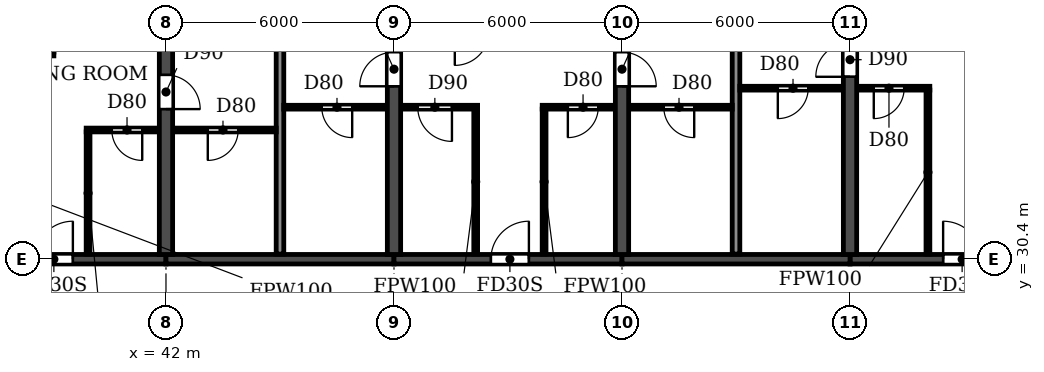
"""IFC4 building model, lengths in metres.
Left out: names, types, materials, properties, quantities, classifications, styles, units other than length and angle.
Written with IfcOpenShell. Run it as: python <this file> out.ifc"""

import sys

from ifc_helpers import new_model, si_unit, direction, frame, frame_2d, origin, place, context, subcontext, project, spatial, rectangle, extrude, element, fill, save


model = new_model("IFC4")
c1 = context("Model", 3, precision=1e-05, world=origin(), true_north=direction((0.0, 1.0)))
c2 = subcontext(c1, "Body", "Model", "MODEL_VIEW")
j1 = project(units=[si_unit("LENGTHUNIT", "METRE"), si_unit("PLANEANGLEUNIT", "RADIAN")], contexts=[c1])
p1 = place(None, origin())
s1 = spatial("IfcSite", under=j1, at=p1, CompositionType="ELEMENT")
p2 = place(p1, origin())
s2 = spatial("IfcBuilding", under=s1, at=p2, CompositionType="ELEMENT")
p3 = place(p2, frame((0.0, 0.0, 82.8)))
s3 = spatial("IfcBuildingStorey", under=s2, at=p3, CompositionType="ELEMENT", Elevation=82.8)
p4 = place(p3, frame((42.0, 30.525, 0.0), z_axis=(0.0, 0.0, 1.0), x_axis=(0.0, 1.0, 0.0)))
e1 = element("IfcWall", 1, at=p4, inside=s3, PredefinedType="SHEAR", context=c2, shape_type="SweptSolid", body=[
    extrude(rectangle(XDim=12.875, YDim=0.35, at=frame_2d((6.438, 0.0))), origin(), (0.0, 0.0, 1.0), 3.06),
])
p5 = place(p4, frame((3.825, 0.0, 0.0)))
e2 = element("IfcOpeningElement", 2, at=p5, cuts=e1, PredefinedType="OPENING", context=c2, shape_type="SweptSolid", body=[
    extrude(rectangle(XDim=0.9, YDim=2.1, at=frame_2d((0.45, 1.05))), frame((0.0, 0.185, 0.0), z_axis=(0.0, -1.0, 0.0), x_axis=(1.0, 0.0, 0.0)), (0.0, 0.0, 1.0), 0.37),
])
p6 = place(p3, frame((48.0, 30.525, 0.0), z_axis=(0.0, 0.0, 1.0), x_axis=(0.0, 1.0, 0.0)))
e3 = element("IfcWall", 3, at=p6, inside=s3, PredefinedType="SHEAR", context=c2, shape_type="SweptSolid", body=[
    extrude(rectangle(XDim=12.875, YDim=0.35, at=frame_2d((6.438, 0.0))), origin(), (0.0, 0.0, 1.0), 3.06),
])
p7 = place(p6, frame((4.425, 0.0, 0.0)))
e4 = element("IfcOpeningElement", 4, at=p7, cuts=e3, PredefinedType="OPENING", context=c2, shape_type="SweptSolid", body=[
    extrude(rectangle(XDim=0.9, YDim=2.1, at=frame_2d((0.45, 1.05))), frame((0.0, 0.185, 0.0), z_axis=(0.0, -1.0, 0.0), x_axis=(1.0, 0.0, 0.0)), (0.0, 0.0, 1.0), 0.37),
])
p8 = place(p3, frame((54.0, 30.525, 0.0), z_axis=(0.0, 0.0, 1.0), x_axis=(0.0, 1.0, 0.0)))
e5 = element("IfcWall", 5, at=p8, inside=s3, PredefinedType="SHEAR", context=c2, shape_type="SweptSolid", body=[
    extrude(rectangle(XDim=12.875, YDim=0.35, at=frame_2d((6.438, 0.0))), origin(), (0.0, 0.0, 1.0), 3.06),
])
p9 = place(p8, frame((4.425, 0.0, 0.0)))
e6 = element("IfcOpeningElement", 6, at=p9, cuts=e5, PredefinedType="OPENING", context=c2, shape_type="SweptSolid", body=[
    extrude(rectangle(XDim=0.9, YDim=2.1, at=frame_2d((0.45, 1.05))), frame((0.0, 0.185, 0.0), z_axis=(0.0, -1.0, 0.0), x_axis=(1.0, 0.0, 0.0)), (0.0, 0.0, 1.0), 0.37),
])
p10 = place(p3, frame((60.0, 30.525, 0.0), z_axis=(0.0, 0.0, 1.0), x_axis=(0.0, 1.0, 0.0)))
e7 = element("IfcWall", 7, at=p10, inside=s3, PredefinedType="SHEAR", context=c2, shape_type="SweptSolid", body=[
    extrude(rectangle(XDim=12.875, YDim=0.35, at=frame_2d((6.438, 0.0))), origin(), (0.0, 0.0, 1.0), 3.06),
])
p11 = place(p10, frame((4.675, 0.0, 0.0)))
e8 = element("IfcOpeningElement", 8, at=p11, cuts=e7, PredefinedType="OPENING", context=c2, shape_type="SweptSolid", body=[
    extrude(rectangle(XDim=0.9, YDim=2.1, at=frame_2d((0.45, 1.05))), frame((0.0, 0.185, 0.0), z_axis=(0.0, -1.0, 0.0), x_axis=(1.0, 0.0, 0.0)), (0.0, 0.0, 1.0), 0.37),
])
p12 = place(p3, frame((36.0, 30.4, 0.0), z_axis=(0.0, 0.0, 1.0), x_axis=(1.0, 0.0, 0.0)))
e9 = element("IfcWall", 9, at=p12, inside=s3, PredefinedType="SHEAR", context=c2, shape_type="SweptSolid", body=[
    extrude(rectangle(XDim=6.0, YDim=0.25, at=frame_2d((3.0, 0.0))), origin(), (0.0, 0.0, 1.0), 2.46),
])
p13 = place(p12, frame((2.55, 0.0, 0.0)))
e10 = element("IfcOpeningElement", 10, at=p13, cuts=e9, PredefinedType="OPENING", context=c2, shape_type="SweptSolid", body=[
    extrude(rectangle(XDim=1.0, YDim=2.1, at=frame_2d((0.5, 1.05))), frame((0.0, 0.135, 0.0), z_axis=(0.0, -1.0, 0.0), x_axis=(1.0, 0.0, 0.0)), (0.0, 0.0, 1.0), 0.27),
])
p14 = place(p3, frame((42.0, 30.4, 0.0), z_axis=(0.0, 0.0, 1.0), x_axis=(1.0, 0.0, 0.0)))
e11 = element("IfcWall", 11, at=p14, inside=s3, PredefinedType="SHEAR", context=c2, shape_type="SweptSolid", body=[
    extrude(rectangle(XDim=6.0, YDim=0.25, at=frame_2d((3.0, 0.0))), origin(), (0.0, 0.0, 1.0), 2.46),
])
p15 = place(p3, frame((48.0, 30.4, 0.0), z_axis=(0.0, 0.0, 1.0), x_axis=(1.0, 0.0, 0.0)))
e12 = element("IfcWall", 12, at=p15, inside=s3, PredefinedType="SHEAR", context=c2, shape_type="SweptSolid", body=[
    extrude(rectangle(XDim=6.0, YDim=0.25, at=frame_2d((3.0, 0.0))), origin(), (0.0, 0.0, 1.0), 2.46),
])
p16 = place(p15, frame((2.55, 0.0, 0.0)))
e13 = element("IfcOpeningElement", 13, at=p16, cuts=e12, PredefinedType="OPENING", context=c2, shape_type="SweptSolid", body=[
    extrude(rectangle(XDim=1.0, YDim=2.1, at=frame_2d((0.5, 1.05))), frame((0.0, 0.135, 0.0), z_axis=(0.0, -1.0, 0.0), x_axis=(1.0, 0.0, 0.0)), (0.0, 0.0, 1.0), 0.27),
])
p17 = place(p3, frame((54.0, 30.4, 0.0), z_axis=(0.0, 0.0, 1.0), x_axis=(1.0, 0.0, 0.0)))
e14 = element("IfcWall", 14, at=p17, inside=s3, PredefinedType="SHEAR", context=c2, shape_type="SweptSolid", body=[
    extrude(rectangle(XDim=6.0, YDim=0.25, at=frame_2d((3.0, 0.0))), origin(), (0.0, 0.0, 1.0), 2.46),
])
p18 = place(p3, frame((60.0, 30.4, 0.0), z_axis=(0.0, 0.0, 1.0), x_axis=(1.0, 0.0, 0.0)))
e15 = element("IfcWall", 15, at=p18, inside=s3, PredefinedType="SHEAR", context=c2, shape_type="SweptSolid", body=[
    extrude(rectangle(XDim=6.0, YDim=0.25, at=frame_2d((3.0, 0.0))), origin(), (0.0, 0.0, 1.0), 2.46),
])
p19 = place(p18, frame((2.45, 0.0, 0.0)))
e16 = element("IfcOpeningElement", 16, at=p19, cuts=e15, PredefinedType="OPENING", context=c2, shape_type="SweptSolid", body=[
    extrude(rectangle(XDim=1.0, YDim=2.1, at=frame_2d((0.5, 1.05))), frame((0.0, 0.135, 0.0), z_axis=(0.0, -1.0, 0.0), x_axis=(1.0, 0.0, 0.0)), (0.0, 0.0, 1.0), 0.27),
])
for number, where, z_axis, x_axis in (
    (17, (45.0, 30.535, 0.0), (0.0, 0.0, 1.0), (0.0, 1.0, 0.0)),
    (18, (57.0, 30.535, 0.0), (0.0, 0.0, 1.0), (0.0, 1.0, 0.0)),
):
    element("IfcWall", number, at=place(p3, frame(where, z_axis=z_axis, x_axis=x_axis)), inside=s3, PredefinedType="PARTITIONING", context=c2, shape_type="SweptSolid", body=[
        extrude(rectangle(XDim=13.005, YDim=0.2, at=frame_2d((6.502, 0.0))), origin(), (0.0, 0.0, 1.0), 3.06),
    ])
p20 = place(p3, frame((39.9, 33.8, 0.0), z_axis=(0.0, 0.0, 1.0), x_axis=(1.0, 0.0, 0.0)))
e19 = element("IfcWall", 19, at=p20, inside=s3, PredefinedType="PARTITIONING", context=c2, shape_type="SweptSolid", body=[
    extrude(rectangle(XDim=1.915, YDim=0.1, at=frame_2d((0.958, 0.0))), origin(), (0.0, 0.0, 1.0), 3.06),
])
p21 = place(p20, frame((0.675, 0.0, 0.0)))
e20 = element("IfcOpeningElement", 20, at=p21, cuts=e19, PredefinedType="OPENING", context=c2, shape_type="SweptSolid", body=[
    extrude(rectangle(XDim=0.8, YDim=2.1, at=frame_2d((0.4, 1.05))), frame((0.0, 0.06, 0.0), z_axis=(0.0, -1.0, 0.0), x_axis=(1.0, 0.0, 0.0)), (0.0, 0.0, 1.0), 0.12),
])
p22 = place(p3, frame((42.185, 33.8, 0.0), z_axis=(0.0, 0.0, 1.0), x_axis=(1.0, 0.0, 0.0)))
e21 = element("IfcWall", 21, at=p22, inside=s3, PredefinedType="PARTITIONING", context=c2, shape_type="SweptSolid", body=[
    extrude(rectangle(XDim=2.715, YDim=0.1, at=frame_2d((1.357, 0.0))), origin(), (0.0, 0.0, 1.0), 3.06),
])
p23 = place(p22, frame((0.915, 0.0, 0.0)))
e22 = element("IfcOpeningElement", 22, at=p23, cuts=e21, PredefinedType="OPENING", context=c2, shape_type="SweptSolid", body=[
    extrude(rectangle(XDim=0.8, YDim=2.1, at=frame_2d((0.4, 1.05))), frame((0.0, 0.06, 0.0), z_axis=(0.0, -1.0, 0.0), x_axis=(1.0, 0.0, 0.0)), (0.0, 0.0, 1.0), 0.12),
])
p24 = place(p3, frame((45.1, 34.4, 0.0), z_axis=(0.0, 0.0, 1.0), x_axis=(1.0, 0.0, 0.0)))
e23 = element("IfcWall", 23, at=p24, inside=s3, PredefinedType="PARTITIONING", context=c2, shape_type="SweptSolid", body=[
    extrude(rectangle(XDim=2.715, YDim=0.1, at=frame_2d((1.357, 0.0))), origin(), (0.0, 0.0, 1.0), 3.06),
])
p25 = place(p24, frame((1.0, 0.0, 0.0)))
e24 = element("IfcOpeningElement", 24, at=p25, cuts=e23, PredefinedType="OPENING", context=c2, shape_type="SweptSolid", body=[
    extrude(rectangle(XDim=0.8, YDim=2.1, at=frame_2d((0.4, 1.05))), frame((0.0, 0.06, 0.0), z_axis=(0.0, -1.0, 0.0), x_axis=(1.0, 0.0, 0.0)), (0.0, 0.0, 1.0), 0.12),
])
p26 = place(p3, frame((48.185, 34.4, 0.0), z_axis=(0.0, 0.0, 1.0), x_axis=(1.0, 0.0, 0.0)))
e25 = element("IfcWall", 25, at=p26, inside=s3, PredefinedType="PARTITIONING", context=c2, shape_type="SweptSolid", body=[
    extrude(rectangle(XDim=2.015, YDim=0.1, at=frame_2d((1.007, 0.0))), origin(), (0.0, 0.0, 1.0), 3.06),
])
p27 = place(p26, frame((0.44, 0.0, 0.0)))
e26 = element("IfcOpeningElement", 26, at=p27, cuts=e25, PredefinedType="OPENING", context=c2, shape_type="SweptSolid", body=[
    extrude(rectangle(XDim=0.9, YDim=2.1, at=frame_2d((0.45, 1.05))), frame((0.0, 0.06, 0.0), z_axis=(0.0, -1.0, 0.0), x_axis=(1.0, 0.0, 0.0)), (0.0, 0.0, 1.0), 0.12),
])
p28 = place(p3, frame((51.9, 34.4, 0.0), z_axis=(0.0, 0.0, 1.0), x_axis=(1.0, 0.0, 0.0)))
e27 = element("IfcWall", 27, at=p28, inside=s3, PredefinedType="PARTITIONING", context=c2, shape_type="SweptSolid", body=[
    extrude(rectangle(XDim=1.915, YDim=0.1, at=frame_2d((0.958, 0.0))), origin(), (0.0, 0.0, 1.0), 3.06),
])
p29 = place(p28, frame((0.675, 0.0, 0.0)))
e28 = element("IfcOpeningElement", 28, at=p29, cuts=e27, PredefinedType="OPENING", context=c2, shape_type="SweptSolid", body=[
    extrude(rectangle(XDim=0.8, YDim=2.1, at=frame_2d((0.4, 1.05))), frame((0.0, 0.06, 0.0), z_axis=(0.0, -1.0, 0.0), x_axis=(1.0, 0.0, 0.0)), (0.0, 0.0, 1.0), 0.12),
])
p30 = place(p3, frame((54.185, 34.4, 0.0), z_axis=(0.0, 0.0, 1.0), x_axis=(1.0, 0.0, 0.0)))
e29 = element("IfcWall", 29, at=p30, inside=s3, PredefinedType="PARTITIONING", context=c2, shape_type="SweptSolid", body=[
    extrude(rectangle(XDim=2.715, YDim=0.1, at=frame_2d((1.357, 0.0))), origin(), (0.0, 0.0, 1.0), 3.06),
])
p31 = place(p30, frame((0.915, 0.0, 0.0)))
e30 = element("IfcOpeningElement", 30, at=p31, cuts=e29, PredefinedType="OPENING", context=c2, shape_type="SweptSolid", body=[
    extrude(rectangle(XDim=0.8, YDim=2.1, at=frame_2d((0.4, 1.05))), frame((0.0, 0.06, 0.0), z_axis=(0.0, -1.0, 0.0), x_axis=(1.0, 0.0, 0.0)), (0.0, 0.0, 1.0), 0.12),
])
p32 = place(p3, frame((57.1, 34.9, 0.0), z_axis=(0.0, 0.0, 1.0), x_axis=(1.0, 0.0, 0.0)))
e31 = element("IfcWall", 31, at=p32, inside=s3, PredefinedType="PARTITIONING", context=c2, shape_type="SweptSolid", body=[
    extrude(rectangle(XDim=2.715, YDim=0.1, at=frame_2d((1.357, 0.0))), origin(), (0.0, 0.0, 1.0), 3.06),
])
p33 = place(p32, frame((1.0, 0.0, 0.0)))
e32 = element("IfcOpeningElement", 32, at=p33, cuts=e31, PredefinedType="OPENING", context=c2, shape_type="SweptSolid", body=[
    extrude(rectangle(XDim=0.8, YDim=2.1, at=frame_2d((0.4, 1.05))), frame((0.0, 0.06, 0.0), z_axis=(0.0, -1.0, 0.0), x_axis=(1.0, 0.0, 0.0)), (0.0, 0.0, 1.0), 0.12),
])
p34 = place(p3, frame((60.185, 34.9, 0.0), z_axis=(0.0, 0.0, 1.0), x_axis=(1.0, 0.0, 0.0)))
e33 = element("IfcWall", 33, at=p34, inside=s3, PredefinedType="PARTITIONING", context=c2, shape_type="SweptSolid", body=[
    extrude(rectangle(XDim=1.915, YDim=0.1, at=frame_2d((0.958, 0.0))), origin(), (0.0, 0.0, 1.0), 3.06),
])
p35 = place(p34, frame((0.44, 0.0, 0.0)))
e34 = element("IfcOpeningElement", 34, at=p35, cuts=e33, PredefinedType="OPENING", context=c2, shape_type="SweptSolid", body=[
    extrude(rectangle(XDim=0.8, YDim=2.1, at=frame_2d((0.4, 1.05))), frame((0.0, 0.06, 0.0), z_axis=(0.0, -1.0, 0.0), x_axis=(1.0, 0.0, 0.0)), (0.0, 0.0, 1.0), 0.12),
])
p36 = place(p3, frame((36.185, 35.8, 0.0), z_axis=(0.0, 0.0, 1.0), x_axis=(1.0, 0.0, 0.0)))
e35 = element("IfcWall", 35, at=p36, inside=s3, PredefinedType="PARTITIONING", context=c2, shape_type="SweptSolid", body=[
    extrude(rectangle(XDim=2.865, YDim=0.1, at=frame_2d((1.433, 0.0))), origin(), (0.0, 0.0, 1.0), 3.06),
])
p37 = place(p36, frame((0.315, 0.0, 0.0)))
e36 = element("IfcOpeningElement", 36, at=p37, cuts=e35, PredefinedType="OPENING", context=c2, shape_type="SweptSolid", body=[
    extrude(rectangle(XDim=0.9, YDim=2.1, at=frame_2d((0.45, 1.05))), frame((0.0, 0.06, 0.0), z_axis=(0.0, -1.0, 0.0), x_axis=(1.0, 0.0, 0.0)), (0.0, 0.0, 1.0), 0.12),
])
p38 = place(p3, frame((39.95, 30.535, 0.0), z_axis=(0.0, 0.0, 1.0), x_axis=(0.0, 1.0, 0.0)))
e37 = element("IfcWall", 37, at=p38, inside=s3, PredefinedType="PARTITIONING", context=c2, shape_type="SweptSolid", body=[
    extrude(rectangle(XDim=3.215, YDim=0.1, at=frame_2d((1.607, 0.0))), origin(), (0.0, 0.0, 1.0), 3.06),
])
for number, where, z_axis, x_axis in (
    (38, (50.15, 30.535, 0.0), (0.0, 0.0, 1.0), (0.0, 1.0, 0.0)),
    (39, (51.95, 30.535, 0.0), (0.0, 0.0, 1.0), (0.0, 1.0, 0.0)),
):
    element("IfcWall", number, at=place(p3, frame(where, z_axis=z_axis, x_axis=x_axis)), inside=s3, PredefinedType="PARTITIONING", context=c2, shape_type="SweptSolid", body=[
        extrude(rectangle(XDim=3.815, YDim=0.1, at=frame_2d((1.908, 0.0))), origin(), (0.0, 0.0, 1.0), 3.06),
    ])
p39 = place(p3, frame((62.05, 30.535, 0.0), z_axis=(0.0, 0.0, 1.0), x_axis=(0.0, 1.0, 0.0)))
e40 = element("IfcWall", 40, at=p39, inside=s3, PredefinedType="PARTITIONING", context=c2, shape_type="SweptSolid", body=[
    extrude(rectangle(XDim=4.315, YDim=0.1, at=frame_2d((2.158, 0.0))), origin(), (0.0, 0.0, 1.0), 3.06),
])
p40 = place(p23, frame((0.8, 0.0, 0.0), z_axis=(0.0, 0.0, 1.0), x_axis=(-1.0, 0.0, 0.0)))
e41 = element("IfcDoor", 41, at=p40, inside=s3, OperationType="SINGLE_SWING_RIGHT", PredefinedType="DOOR", context=c2, shape_type="SweptSolid", body=[
    extrude(rectangle(XDim=0.8, YDim=2.1, at=frame_2d((0.4, 1.05))), frame((0.0, 0.025, 0.0), z_axis=(0.0, -1.0, 0.0), x_axis=(1.0, 0.0, 0.0)), (0.0, 0.0, 1.0), 0.05),
])
fill(e22, e41)
p41 = place(p13, origin())
e42 = element("IfcDoor", 42, at=p41, inside=s3, OperationType="SINGLE_SWING_RIGHT", PredefinedType="DOOR", context=c2, shape_type="SweptSolid", body=[
    extrude(rectangle(XDim=1.0, YDim=2.1, at=frame_2d((0.5, 1.05))), frame((0.0, 0.025, 0.0), z_axis=(0.0, -1.0, 0.0), x_axis=(1.0, 0.0, 0.0)), (0.0, 0.0, 1.0), 0.05),
])
fill(e10, e42)
p42 = place(p21, frame((0.8, 0.0, 0.0), z_axis=(0.0, 0.0, 1.0), x_axis=(-1.0, 0.0, 0.0)))
e43 = element("IfcDoor", 43, at=p42, inside=s3, OperationType="SINGLE_SWING_LEFT", PredefinedType="DOOR", context=c2, shape_type="SweptSolid", body=[
    extrude(rectangle(XDim=0.8, YDim=2.1, at=frame_2d((0.4, 1.05))), frame((0.0, 0.025, 0.0), z_axis=(0.0, -1.0, 0.0), x_axis=(1.0, 0.0, 0.0)), (0.0, 0.0, 1.0), 0.05),
])
fill(e20, e43)
p43 = place(p5, frame((0.9, 0.0, 0.0), z_axis=(0.0, 0.0, 1.0), x_axis=(-1.0, 0.0, 0.0)))
e44 = element("IfcDoor", 44, at=p43, inside=s3, OperationType="SINGLE_SWING_RIGHT", PredefinedType="DOOR", context=c2, shape_type="SweptSolid", body=[
    extrude(rectangle(XDim=0.9, YDim=2.1, at=frame_2d((0.45, 1.05))), frame((0.0, 0.025, 0.0), z_axis=(0.0, -1.0, 0.0), x_axis=(1.0, 0.0, 0.0)), (0.0, 0.0, 1.0), 0.05),
])
fill(e2, e44)
p44 = place(p25, frame((0.8, 0.0, 0.0), z_axis=(0.0, 0.0, 1.0), x_axis=(-1.0, 0.0, 0.0)))
e45 = element("IfcDoor", 45, at=p44, inside=s3, OperationType="SINGLE_SWING_LEFT", PredefinedType="DOOR", context=c2, shape_type="SweptSolid", body=[
    extrude(rectangle(XDim=0.8, YDim=2.1, at=frame_2d((0.4, 1.05))), frame((0.0, 0.025, 0.0), z_axis=(0.0, -1.0, 0.0), x_axis=(1.0, 0.0, 0.0)), (0.0, 0.0, 1.0), 0.05),
])
fill(e24, e45)
p45 = place(p31, frame((0.8, 0.0, 0.0), z_axis=(0.0, 0.0, 1.0), x_axis=(-1.0, 0.0, 0.0)))
e46 = element("IfcDoor", 46, at=p45, inside=s3, OperationType="SINGLE_SWING_LEFT", PredefinedType="DOOR", context=c2, shape_type="SweptSolid", body=[
    extrude(rectangle(XDim=0.8, YDim=2.1, at=frame_2d((0.4, 1.05))), frame((0.0, 0.025, 0.0), z_axis=(0.0, -1.0, 0.0), x_axis=(1.0, 0.0, 0.0)), (0.0, 0.0, 1.0), 0.05),
])
fill(e30, e46)
p46 = place(p7, origin())
e47 = element("IfcDoor", 47, at=p46, inside=s3, OperationType="SINGLE_SWING_LEFT", PredefinedType="DOOR", context=c2, shape_type="SweptSolid", body=[
    extrude(rectangle(XDim=0.9, YDim=2.1, at=frame_2d((0.45, 1.05))), frame((0.0, 0.025, 0.0), z_axis=(0.0, -1.0, 0.0), x_axis=(1.0, 0.0, 0.0)), (0.0, 0.0, 1.0), 0.05),
])
fill(e4, e47)
p47 = place(p27, frame((0.9, 0.0, 0.0), z_axis=(0.0, 0.0, 1.0), x_axis=(-1.0, 0.0, 0.0)))
e48 = element("IfcDoor", 48, at=p47, inside=s3, OperationType="SINGLE_SWING_LEFT", PredefinedType="DOOR", context=c2, shape_type="SweptSolid", body=[
    extrude(rectangle(XDim=0.9, YDim=2.1, at=frame_2d((0.45, 1.05))), frame((0.0, 0.025, 0.0), z_axis=(0.0, -1.0, 0.0), x_axis=(1.0, 0.0, 0.0)), (0.0, 0.0, 1.0), 0.05),
])
fill(e26, e48)
p48 = place(p16, origin())
e49 = element("IfcDoor", 49, at=p48, inside=s3, OperationType="SINGLE_SWING_RIGHT", PredefinedType="DOOR", context=c2, shape_type="SweptSolid", body=[
    extrude(rectangle(XDim=1.0, YDim=2.1, at=frame_2d((0.5, 1.05))), frame((0.0, 0.025, 0.0), z_axis=(0.0, -1.0, 0.0), x_axis=(1.0, 0.0, 0.0)), (0.0, 0.0, 1.0), 0.05),
])
fill(e13, e49)
p49 = place(p29, frame((0.8, 0.0, 0.0), z_axis=(0.0, 0.0, 1.0), x_axis=(-1.0, 0.0, 0.0)))
e50 = element("IfcDoor", 50, at=p49, inside=s3, OperationType="SINGLE_SWING_RIGHT", PredefinedType="DOOR", context=c2, shape_type="SweptSolid", body=[
    extrude(rectangle(XDim=0.8, YDim=2.1, at=frame_2d((0.4, 1.05))), frame((0.0, 0.025, 0.0), z_axis=(0.0, -1.0, 0.0), x_axis=(1.0, 0.0, 0.0)), (0.0, 0.0, 1.0), 0.05),
])
fill(e28, e50)
p50 = place(p9, frame((0.9, 0.0, 0.0), z_axis=(0.0, 0.0, 1.0), x_axis=(-1.0, 0.0, 0.0)))
e51 = element("IfcDoor", 51, at=p50, inside=s3, OperationType="SINGLE_SWING_RIGHT", PredefinedType="DOOR", context=c2, shape_type="SweptSolid", body=[
    extrude(rectangle(XDim=0.9, YDim=2.1, at=frame_2d((0.45, 1.05))), frame((0.0, 0.025, 0.0), z_axis=(0.0, -1.0, 0.0), x_axis=(1.0, 0.0, 0.0)), (0.0, 0.0, 1.0), 0.05),
])
fill(e6, e51)
p51 = place(p33, frame((0.8, 0.0, 0.0), z_axis=(0.0, 0.0, 1.0), x_axis=(-1.0, 0.0, 0.0)))
e52 = element("IfcDoor", 52, at=p51, inside=s3, OperationType="SINGLE_SWING_RIGHT", PredefinedType="DOOR", context=c2, shape_type="SweptSolid", body=[
    extrude(rectangle(XDim=0.8, YDim=2.1, at=frame_2d((0.4, 1.05))), frame((0.0, 0.025, 0.0), z_axis=(0.0, -1.0, 0.0), x_axis=(1.0, 0.0, 0.0)), (0.0, 0.0, 1.0), 0.05),
])
fill(e32, e52)
p52 = place(p11, origin())
e53 = element("IfcDoor", 53, at=p52, inside=s3, OperationType="SINGLE_SWING_LEFT", PredefinedType="DOOR", context=c2, shape_type="SweptSolid", body=[
    extrude(rectangle(XDim=0.9, YDim=2.1, at=frame_2d((0.45, 1.05))), frame((0.0, 0.025, 0.0), z_axis=(0.0, -1.0, 0.0), x_axis=(1.0, 0.0, 0.0)), (0.0, 0.0, 1.0), 0.05),
])
fill(e8, e53)
p53 = place(p35, frame((0.8, 0.0, 0.0), z_axis=(0.0, 0.0, 1.0), x_axis=(-1.0, 0.0, 0.0)))
e54 = element("IfcDoor", 54, at=p53, inside=s3, OperationType="SINGLE_SWING_RIGHT", PredefinedType="DOOR", context=c2, shape_type="SweptSolid", body=[
    extrude(rectangle(XDim=0.8, YDim=2.1, at=frame_2d((0.4, 1.05))), frame((0.0, 0.025, 0.0), z_axis=(0.0, -1.0, 0.0), x_axis=(1.0, 0.0, 0.0)), (0.0, 0.0, 1.0), 0.05),
])
fill(e34, e54)
p54 = place(p19, origin())
e55 = element("IfcDoor", 55, at=p54, inside=s3, OperationType="SINGLE_SWING_LEFT", PredefinedType="DOOR", context=c2, shape_type="SweptSolid", body=[
    extrude(rectangle(XDim=1.0, YDim=2.1, at=frame_2d((0.5, 1.05))), frame((0.0, 0.025, 0.0), z_axis=(0.0, -1.0, 0.0), x_axis=(1.0, 0.0, 0.0)), (0.0, 0.0, 1.0), 0.05),
])
fill(e16, e55)
save(model, sys.argv[1])
